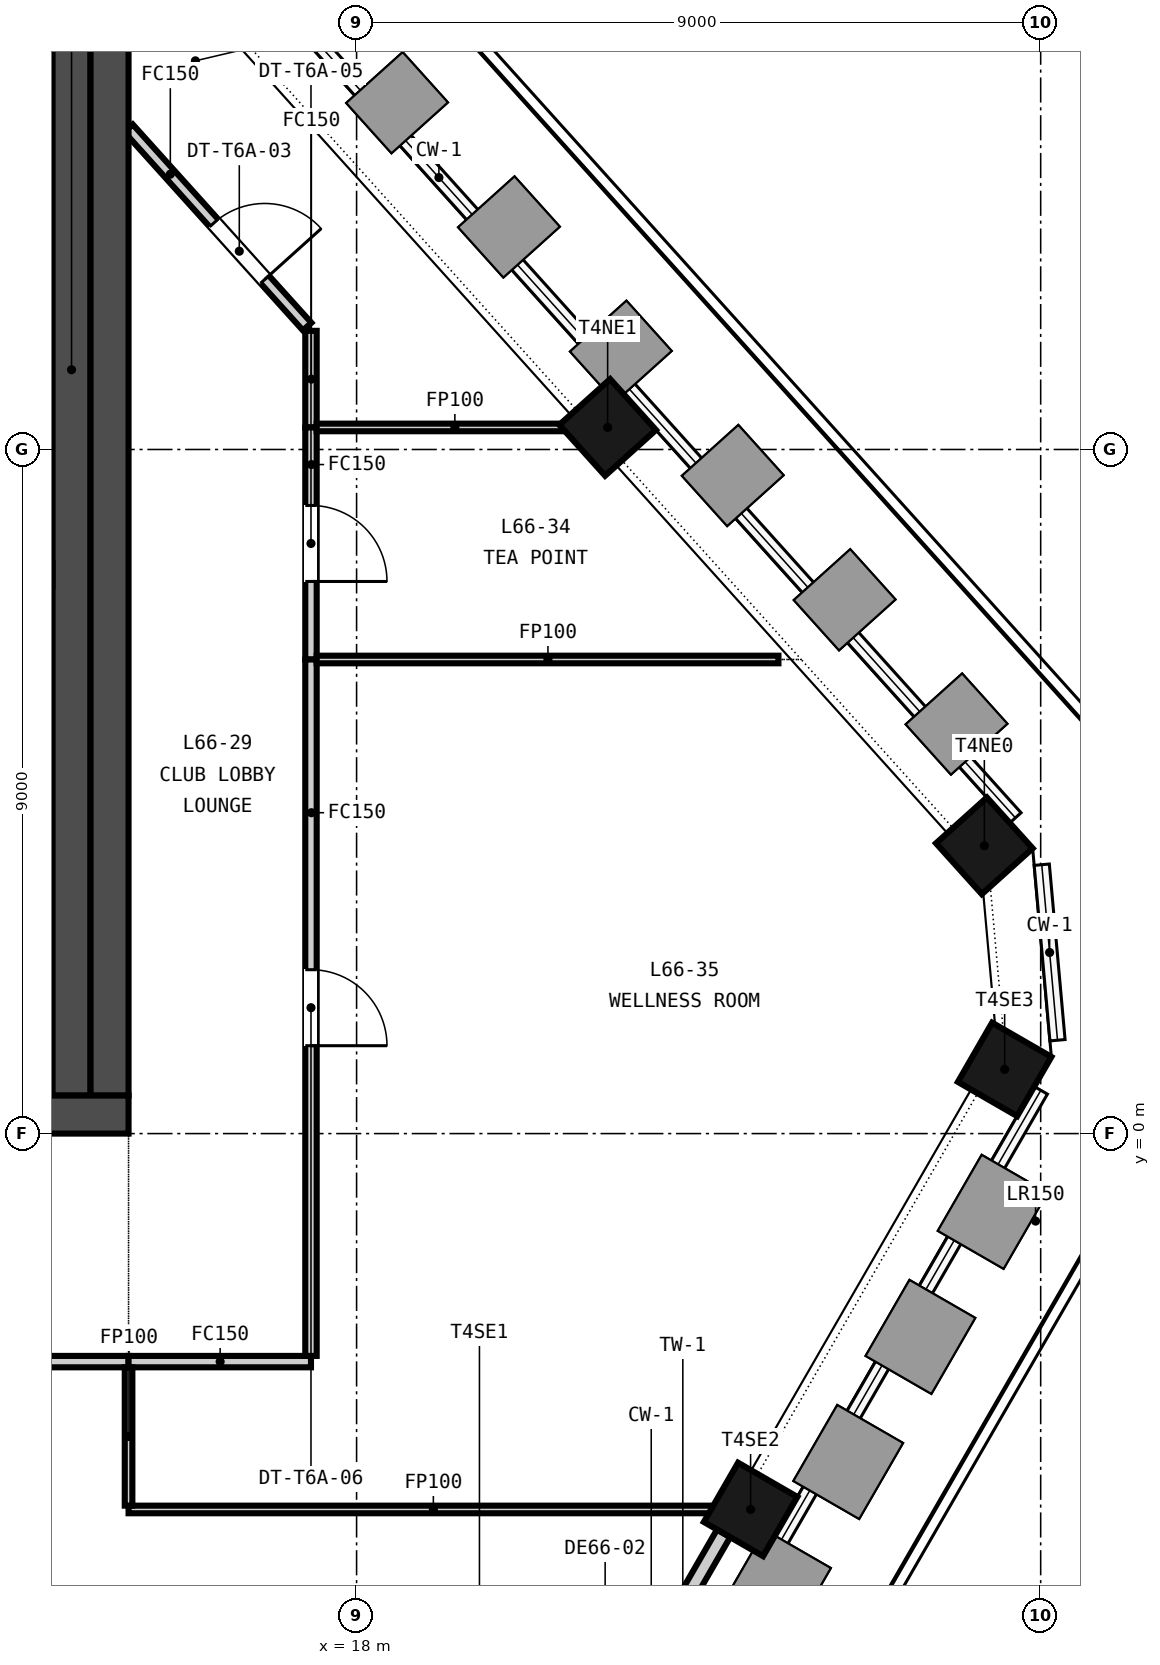
"""IFC4 building model, lengths in metres.
Left out: names, types, materials, properties, quantities, classifications, styles, units other than length and angle.
Written with IfcOpenShell. Run it as: python <this file> out.ifc"""

import sys

from ifc_helpers import new_model, si_unit, direction, frame, frame_2d, origin, origin_2d, place, context, subcontext, project, spatial, rectangle, extrude, element, fill, save


model = new_model("IFC4")
c1 = context("Model", 3, precision=1e-05, world=origin(), true_north=direction((0.0, 1.0)))
c2 = subcontext(c1, "Body", "Model", "MODEL_VIEW")
j1 = project(units=[si_unit("LENGTHUNIT", "METRE"), si_unit("PLANEANGLEUNIT", "RADIAN")], contexts=[c1])
p1 = place(None, origin())
s1 = spatial("IfcSite", under=j1, at=p1, CompositionType="ELEMENT")
p2 = place(p1, origin())
s2 = spatial("IfcBuilding", under=s1, at=p2, CompositionType="ELEMENT")
p3 = place(p2, frame((0.0, 0.0, 260.95)))
s3 = spatial("IfcBuildingStorey", under=s2, at=p3, CompositionType="ELEMENT", Elevation=260.95)
p4 = place(p3, frame((-15.0, 0.25, -0.15), z_axis=(0.0, 0.0, 1.0), x_axis=(1.0, 0.0, 0.0)))
e1 = element("IfcWall", 1, at=p4, inside=s3, PredefinedType="SOLIDWALL", context=c2, shape_type="SweptSolid", body=[
    extrude(rectangle(XDim=30.0, YDim=0.5, at=frame_2d((15.0, 0.0))), origin(), (0.0, 0.0, 1.0), 3.65),
])
p5 = place(p4, frame((5.8, 0.0, 0.15)))
e2 = element("IfcOpeningElement", 2, at=p5, cuts=e1, PredefinedType="OPENING", context=c2, shape_type="SweptSolid", body=[
    extrude(rectangle(XDim=2.4, YDim=2.4, at=frame_2d((1.2, 1.2))), frame((0.0, 0.26, 0.0), z_axis=(0.0, -1.0, 0.0), x_axis=(1.0, 0.0, 0.0)), (0.0, 0.0, 1.0), 0.52),
])
p6 = place(p4, frame((13.8, 0.0, 0.15)))
e3 = element("IfcOpeningElement", 3, at=p6, cuts=e1, PredefinedType="OPENING", context=c2, shape_type="SweptSolid", body=[
    extrude(rectangle(XDim=2.4, YDim=2.4, at=frame_2d((1.2, 1.2))), frame((0.0, 0.26, 0.0), z_axis=(0.0, -1.0, 0.0), x_axis=(1.0, 0.0, 0.0)), (0.0, 0.0, 1.0), 0.52),
])
p7 = place(p4, frame((21.8, 0.0, 0.15)))
e4 = element("IfcOpeningElement", 4, at=p7, cuts=e1, PredefinedType="OPENING", context=c2, shape_type="SweptSolid", body=[
    extrude(rectangle(XDim=2.4, YDim=2.4, at=frame_2d((1.2, 1.2))), frame((0.0, 0.26, 0.0), z_axis=(0.0, -1.0, 0.0), x_axis=(1.0, 0.0, 0.0)), (0.0, 0.0, 1.0), 0.52),
])
p8 = place(p4, frame((1.5, 0.0, 0.15)))
e5 = element("IfcOpeningElement", 5, at=p8, cuts=e1, PredefinedType="OPENING", context=c2, shape_type="SweptSolid", body=[
    extrude(rectangle(XDim=1.2, YDim=2.1, at=frame_2d((0.6, 1.05))), frame((0.0, 0.26, 0.0), z_axis=(0.0, -1.0, 0.0), x_axis=(1.0, 0.0, 0.0)), (0.0, 0.0, 1.0), 0.52),
])
p9 = place(p4, frame((27.3, 0.0, 0.15)))
e6 = element("IfcOpeningElement", 6, at=p9, cuts=e1, PredefinedType="OPENING", context=c2, shape_type="SweptSolid", body=[
    extrude(rectangle(XDim=1.2, YDim=2.1, at=frame_2d((0.6, 1.05))), frame((0.0, 0.26, 0.0), z_axis=(0.0, -1.0, 0.0), x_axis=(1.0, 0.0, 0.0)), (0.0, 0.0, 1.0), 0.52),
])
p10 = place(p3, frame((14.75, 0.5, -0.15), z_axis=(0.0, 0.0, 1.0), x_axis=(0.0, 1.0, 0.0)))
e7 = element("IfcWall", 7, at=p10, inside=s3, PredefinedType="SOLIDWALL", context=c2, shape_type="SweptSolid", body=[
    extrude(rectangle(XDim=14.0, YDim=0.5, at=frame_2d((7.0, 0.0))), origin(), (0.0, 0.0, 1.0), 3.65),
])
for number, where, z_axis, x_axis in (
    (8, (23.184, -4.945, -0.15), (0.0, 0.0, 1.0), (0.5, 0.866, 0.0)),
    (9, (26.526, 0.844, -0.15), (0.0, 0.0, 1.0), (0.5, 0.866, 0.0)),
    (10, (26.259, 3.786, -0.15), (0.0, 0.0, 1.0), (-0.669, 0.743, 0.0)),
    (11, (21.303, 9.29, -0.15), (0.0, 0.0, 1.0), (-0.669, 0.743, 0.0)),
):
    element("IfcColumn", number, at=place(p3, frame(where, z_axis=z_axis, x_axis=x_axis)), inside=s3, PredefinedType="COLUMN", context=c2, shape_type="SweptSolid", body=[
        extrude(rectangle(XDim=0.9, YDim=0.9, at=origin_2d()), origin(), (0.0, 0.0, 1.0), 3.65),
    ])
p11 = place(p3, frame((19.711, -10.659, 0.0), z_axis=(0.0, 0.0, 1.0), x_axis=(0.500026397028, 0.866010162917, 0.0)))
e12 = element("IfcWall", 12, at=p11, inside=s3, PredefinedType="SOLIDWALL", context=c2, shape_type="SweptSolid", body=[
    extrude(rectangle(XDim=6.235, YDim=0.2, at=frame_2d((3.117, 0.0))), origin(), (0.0, 0.0, 1.0), 2.85),
])
p12 = place(p11, frame((2.217, 0.0, 0.0)))
e13 = element("IfcOpeningElement", 13, at=p12, cuts=e12, PredefinedType="OPENING", context=c2, shape_type="SweptSolid", body=[
    extrude(rectangle(XDim=1.8, YDim=2.4, at=frame_2d((0.9, 1.2))), frame((0.0, 0.11, 0.0), z_axis=(0.0, -1.0, 0.0), x_axis=(1.0, 0.0, 0.0)), (0.0, 0.0, 1.0), 0.22),
])
p13 = place(p3, frame((11.05, 7.35, 0.0), z_axis=(0.0, 0.0, 1.0), x_axis=(1.0, 0.0, 0.0)))
e14 = element("IfcWall", 14, at=p13, inside=s3, PredefinedType="SOLIDWALL", context=c2, shape_type="SweptSolid", body=[
    extrude(rectangle(XDim=2.95, YDim=0.3, at=frame_2d((1.475, 0.0))), origin(), (0.0, 0.0, 1.0), 3.5),
])
p14 = place(p3, frame((14.25, 0.5, 0.0), z_axis=(0.0, 0.0, 1.0), x_axis=(0.0, 1.0, 0.0)))
e15 = element("IfcWall", 15, at=p14, inside=s3, PredefinedType="SOLIDWALL", context=c2, shape_type="SweptSolid", body=[
    extrude(rectangle(XDim=14.0, YDim=0.5, at=frame_2d((7.0, 0.0))), origin(), (0.0, 0.0, 1.0), 3.5),
])
p15 = place(p3, frame((15.0, -3.0, 0.0), z_axis=(0.0, 0.0, 1.0), x_axis=(-1.0, 0.0, 0.0)))
e16 = element("IfcWall", 16, at=p15, inside=s3, PredefinedType="PARTITIONING", context=c2, shape_type="SweptSolid", body=[
    extrude(rectangle(XDim=30.0, YDim=0.15, at=frame_2d((15.0, 0.0))), origin(), (0.0, 0.0, 1.0), 2.751),
])
p16 = place(p15, frame((14.1, 0.0, 0.0)))
e17 = element("IfcOpeningElement", 17, at=p16, cuts=e16, PredefinedType="OPENING", context=c2, shape_type="SweptSolid", body=[
    extrude(rectangle(XDim=1.8, YDim=2.1, at=frame_2d((0.9, 1.05))), frame((0.0, 0.085, 0.0), z_axis=(0.0, -1.0, 0.0), x_axis=(1.0, 0.0, 0.0)), (0.0, 0.0, 1.0), 0.17),
])
p17 = place(p3, frame((17.4, 10.561, 0.0), z_axis=(0.0, 0.0, 1.0), x_axis=(0.0, -1.0, 0.0)))
e18 = element("IfcWall", 18, at=p17, inside=s3, PredefinedType="PARTITIONING", context=c2, shape_type="SweptSolid", body=[
    extrude(rectangle(XDim=1.271, YDim=0.15, at=frame_2d((0.635, 0.0))), origin(), (0.0, 0.0, 1.0), 2.751),
])
p18 = place(p3, frame((17.4, 9.29, 0.0), z_axis=(0.0, 0.0, 1.0), x_axis=(0.0, -1.0, 0.0)))
e19 = element("IfcWall", 19, at=p18, inside=s3, PredefinedType="PARTITIONING", context=c2, shape_type="SweptSolid", body=[
    extrude(rectangle(XDim=3.053, YDim=0.15, at=frame_2d((1.526, 0.0))), origin(), (0.0, 0.0, 1.0), 2.751),
])
p19 = place(p18, frame((1.027, 0.0, 0.0)))
e20 = element("IfcOpeningElement", 20, at=p19, cuts=e19, PredefinedType="OPENING", context=c2, shape_type="SweptSolid", body=[
    extrude(rectangle(XDim=1.0, YDim=2.1, at=frame_2d((0.5, 1.05))), frame((0.0, 0.085, 0.0), z_axis=(0.0, -1.0, 0.0), x_axis=(1.0, 0.0, 0.0)), (0.0, 0.0, 1.0), 0.17),
])
p20 = place(p3, frame((17.4, -3.0, 0.0), z_axis=(0.0, 0.0, 1.0), x_axis=(-1.0, 0.0, 0.0)))
e21 = element("IfcWall", 21, at=p20, inside=s3, PredefinedType="PARTITIONING", context=c2, shape_type="SweptSolid", body=[
    extrude(rectangle(XDim=2.4, YDim=0.15, at=frame_2d((1.2, 0.0))), origin(), (0.0, 0.0, 1.0), 2.751),
])
p21 = place(p3, frame((17.4, 6.237, 0.0), z_axis=(0.0, 0.0, 1.0), x_axis=(0.0, -1.0, 0.0)))
e22 = element("IfcWall", 22, at=p21, inside=s3, PredefinedType="PARTITIONING", context=c2, shape_type="SweptSolid", body=[
    extrude(rectangle(XDim=9.162, YDim=0.15, at=frame_2d((4.581, 0.0))), origin(), (0.0, 0.0, 1.0), 2.751),
])
p22 = place(p21, frame((4.081, 0.0, 0.0)))
e23 = element("IfcOpeningElement", 23, at=p22, cuts=e22, PredefinedType="OPENING", context=c2, shape_type="SweptSolid", body=[
    extrude(rectangle(XDim=1.0, YDim=2.1, at=frame_2d((0.5, 1.05))), frame((0.0, 0.085, 0.0), z_axis=(0.0, -1.0, 0.0), x_axis=(1.0, 0.0, 0.0)), (0.0, 0.0, 1.0), 0.17),
])
p23 = place(p3, frame((15.0, 13.226, 0.0), z_axis=(0.0, 0.0, 1.0), x_axis=(0.669187491984, -0.743093601488, 0.0)))
e24 = element("IfcWall", 24, at=p23, inside=s3, PredefinedType="PARTITIONING", context=c2, shape_type="SweptSolid", body=[
    extrude(rectangle(XDim=3.511, YDim=0.15, at=frame_2d((1.756, 0.0))), origin(), (0.0, 0.0, 1.0), 2.751),
])
p24 = place(p23, frame((1.677, 0.0, 0.0)))
e25 = element("IfcOpeningElement", 25, at=p24, cuts=e24, PredefinedType="OPENING", context=c2, shape_type="SweptSolid", body=[
    extrude(rectangle(XDim=1.0, YDim=2.1, at=frame_2d((0.5, 1.05))), frame((0.0, 0.085, 0.0), z_axis=(0.0, -1.0, 0.0), x_axis=(1.0, 0.0, 0.0)), (0.0, 0.0, 1.0), 0.17),
])
p25 = place(p3, frame((17.475, 9.29, 0.0), z_axis=(0.0, 0.0, 1.0), x_axis=(1.0, 0.0, 0.0)))
e26 = element("IfcWall", 26, at=p25, inside=s3, PredefinedType="PARTITIONING", context=c2, shape_type="SweptSolid", body=[
    extrude(rectangle(XDim=3.626, YDim=0.1, at=frame_2d((1.813, 0.0))), origin(), (0.0, 0.0, 1.0), 2.751),
])
p26 = place(p3, frame((17.475, 6.237, 0.0), z_axis=(0.0, 0.0, 1.0), x_axis=(1.0, 0.0, 0.0)))
e27 = element("IfcWall", 27, at=p26, inside=s3, PredefinedType="PARTITIONING", context=c2, shape_type="SweptSolid", body=[
    extrude(rectangle(XDim=6.075, YDim=0.1, at=frame_2d((3.038, 0.0))), origin(), (0.0, 0.0, 1.0), 2.751),
])
p27 = place(p3, frame((15.0, -4.945, 0.0), z_axis=(0.0, 0.0, 1.0), x_axis=(1.0, 0.0, 0.0)))
e28 = element("IfcWall", 28, at=p27, inside=s3, PredefinedType="PARTITIONING", context=c2, shape_type="SweptSolid", body=[
    extrude(rectangle(XDim=8.01, YDim=0.1, at=frame_2d((4.005, 0.0))), origin(), (0.0, 0.0, 1.0), 2.751),
])
p28 = place(p3, frame((15.0, -4.895, 0.0), z_axis=(0.0, 0.0, 1.0), x_axis=(0.0, 1.0, 0.0)))
e29 = element("IfcWall", 29, at=p28, inside=s3, PredefinedType="PARTITIONING", context=c2, shape_type="SweptSolid", body=[
    extrude(rectangle(XDim=1.82, YDim=0.1, at=frame_2d((0.91, 0.0))), origin(), (0.0, 0.0, 1.0), 2.751),
])
p29 = place(p24, origin())
e30 = element("IfcDoor", 30, at=p29, inside=s3, OperationType="SINGLE_SWING_RIGHT", PredefinedType="DOOR", context=c2, shape_type="SweptSolid", body=[
    extrude(rectangle(XDim=1.0, YDim=2.1, at=frame_2d((0.5, 1.05))), frame((0.0, 0.025, 0.0), z_axis=(0.0, -1.0, 0.0), x_axis=(1.0, 0.0, 0.0)), (0.0, 0.0, 1.0), 0.05),
])
fill(e25, e30)
p30 = place(p19, origin())
e31 = element("IfcDoor", 31, at=p30, inside=s3, OperationType="SINGLE_SWING_RIGHT", PredefinedType="DOOR", context=c2, shape_type="SweptSolid", body=[
    extrude(rectangle(XDim=1.0, YDim=2.1, at=frame_2d((0.5, 1.05))), frame((0.0, 0.025, 0.0), z_axis=(0.0, -1.0, 0.0), x_axis=(1.0, 0.0, 0.0)), (0.0, 0.0, 1.0), 0.05),
])
fill(e20, e31)
p31 = place(p22, origin())
e32 = element("IfcDoor", 32, at=p31, inside=s3, OperationType="SINGLE_SWING_RIGHT", PredefinedType="DOOR", context=c2, shape_type="SweptSolid", body=[
    extrude(rectangle(XDim=1.0, YDim=2.1, at=frame_2d((0.5, 1.05))), frame((0.0, 0.025, 0.0), z_axis=(0.0, -1.0, 0.0), x_axis=(1.0, 0.0, 0.0)), (0.0, 0.0, 1.0), 0.05),
])
fill(e23, e32)
save(model, sys.argv[1])
